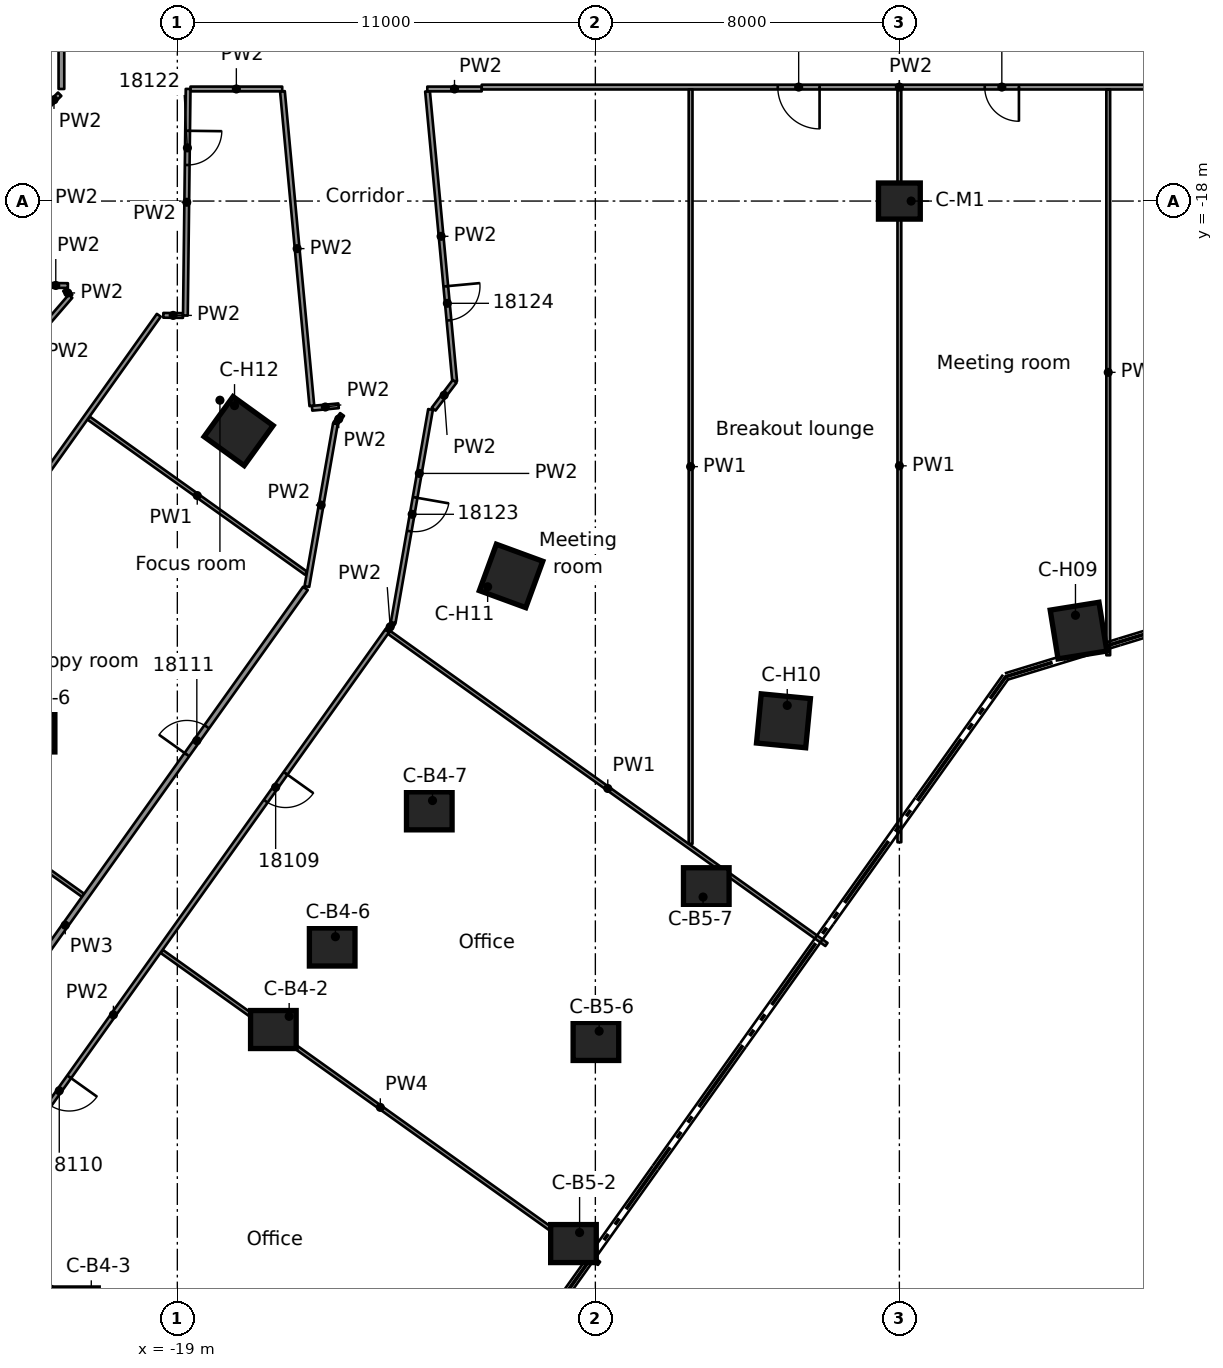
"""IFC4 building model, lengths in metres.
Left out: names, types, materials, properties, quantities, classifications, styles, units other than length and angle.
Written with IfcOpenShell. Run it as: python <this file> out.ifc"""

import sys

from ifc_helpers import new_model, si_unit, direction, frame, frame_2d, origin, origin_2d, place, context, subcontext, project, spatial, rectangle, extrude, element, fill, save


model = new_model("IFC4")
c1 = context("Model", 3, precision=1e-05, world=origin(), true_north=direction((0.0, 1.0)))
c2 = subcontext(c1, "Body", "Model", "MODEL_VIEW")
j1 = project(units=[si_unit("LENGTHUNIT", "METRE"), si_unit("PLANEANGLEUNIT", "RADIAN")], contexts=[c1])
p1 = place(None, origin())
s1 = spatial("IfcSite", under=j1, at=p1, CompositionType="ELEMENT")
p2 = place(p1, origin())
s2 = spatial("IfcBuilding", under=s1, at=p2, CompositionType="ELEMENT")
p3 = place(p2, frame((0.0, 0.0, 91.2)))
s3 = spatial("IfcBuildingStorey", under=s2, at=p3, CompositionType="ELEMENT", Elevation=91.2)
for number, where, z_axis, x_axis in (
    (1, (-22.822, -31.995, 0.0), (0.0, 0.0, 1.0), (1.0, 0.0, 0.0)),
    (2, (-16.473, -39.799, 0.0), (0.0, 0.0, 1.0), (1.0, 0.0, 0.0)),
    (3, (-21.68, -47.098, 0.0), (0.0, 0.0, 1.0), (1.0, 0.0, 0.0)),
    (4, (-14.925, -37.628, 0.0), (0.0, 0.0, 1.0), (1.0, 0.0, 0.0)),
    (5, (-12.37, -34.045, 0.0), (0.0, 0.0, 1.0), (1.0, 0.0, 0.0)),
    (6, (-8.576, -45.431, 0.0), (0.0, 0.0, 1.0), (1.0, 0.0, 0.0)),
    (7, (-7.985, -40.113, 0.0), (0.0, 0.0, 1.0), (1.0, 0.0, 0.0)),
    (8, (-5.081, -36.042, 0.0), (0.0, 0.0, 1.0), (1.0, 0.0, 0.0)),
):
    element("IfcColumn", number, at=place(p3, frame(where, z_axis=z_axis, x_axis=x_axis)), inside=s3, PredefinedType="COLUMN", context=c2, shape_type="SweptSolid", body=[
        extrude(rectangle(XDim=1.2, YDim=1.0, at=origin_2d()), origin(), (0.0, 0.0, 1.0), 3.5),
    ])
for number, where, z_axis, x_axis in (
    (9, (4.714, -29.302, 0.0), (0.0, 0.0, 1.0), (0.159, -0.987, 0.0)),
    (10, (-3.05, -31.676, 0.0), (0.0, 0.0, 1.0), (-0.096, -0.995, 0.0)),
    (11, (-10.218, -27.864, 0.0), (0.0, 0.0, 1.0), (-0.344, -0.939, 0.0)),
    (12, (-17.387, -24.053, 0.0), (0.0, 0.0, 1.0), (-0.586, -0.81, 0.0)),
):
    element("IfcColumn", number, at=place(p3, frame(where, z_axis=z_axis, x_axis=x_axis)), inside=s3, PredefinedType="COLUMN", context=c2, shape_type="SweptSolid", body=[
        extrude(rectangle(XDim=1.3, YDim=1.3, at=origin_2d()), origin(), (0.0, 0.0, 1.0), 3.5),
    ])
p4 = place(p3, frame((0.0, -18.0, 0.0), z_axis=(0.0, 0.0, 1.0), x_axis=(1.0, 0.0, 0.0)))
e13 = element("IfcColumn", 13, at=p4, inside=s3, PredefinedType="COLUMN", context=c2, shape_type="SweptSolid", body=[
    extrude(rectangle(XDim=1.1, YDim=0.95, at=origin_2d()), origin(), (0.0, 0.0, 1.0), 3.5),
])
p5 = place(p3, frame((-16.234, -15.113, 0.0), z_axis=(0.0, 0.0, 1.0), x_axis=(0.093098705764, -0.995656884165, 0.0)))
e14 = element("IfcWall", 14, at=p5, inside=s3, PredefinedType="PARTITIONING", context=c2, shape_type="SweptSolid", body=[
    extrude(rectangle(XDim=8.313, YDim=0.125, at=frame_2d((4.156, 0.0))), origin(), (0.0, 0.0, 1.0), 3.08),
])
p6 = place(p3, frame((-12.416, -15.113, 0.0), z_axis=(0.0, 0.0, 1.0), x_axis=(0.093186749475, -0.995648647728, 0.0)))
e15 = element("IfcWall", 15, at=p6, inside=s3, PredefinedType="PARTITIONING", context=c2, shape_type="SweptSolid", body=[
    extrude(rectangle(XDim=7.663, YDim=0.125, at=frame_2d((3.832, 0.0))), origin(), (0.0, 0.0, 1.0), 3.08),
])
p7 = place(p6, frame((5.152, 0.0, 0.0)))
e16 = element("IfcOpeningElement", 16, at=p7, cuts=e15, PredefinedType="OPENING", context=c2, shape_type="SweptSolid", body=[
    extrude(rectangle(XDim=0.9, YDim=2.1, at=frame_2d((0.45, 1.05))), frame((0.0, 0.073, 0.0), z_axis=(0.0, -1.0, 0.0), x_axis=(1.0, 0.0, 0.0)), (0.0, 0.0, 1.0), 0.145),
])
p8 = place(p3, frame((-21.955, -20.33, 0.0), z_axis=(0.0, 0.0, 1.0), x_axis=(0.635933908165, -0.771743522451, 0.0)))
e17 = element("IfcWall", 17, at=p8, inside=s3, PredefinedType="PARTITIONING", context=c2, shape_type="SweptSolid", body=[
    extrude(rectangle(XDim=0.227, YDim=0.125, at=frame_2d((0.113, 0.0))), origin(), (0.0, 0.0, 1.0), 3.08),
])
p9 = place(p3, frame((-24.581, -44.988, 0.0), z_axis=(0.0, 0.0, 1.0), x_axis=(0.814126528241, -0.580687520112, 0.0)))
e18 = element("IfcWall", 18, at=p9, inside=s3, PredefinedType="PARTITIONING", context=c2, shape_type="SweptSolid", body=[
    extrude(rectangle(XDim=14.137, YDim=0.1, at=frame_2d((7.068, 0.0))), origin(), (0.0, 0.0, 1.0), 3.08),
])
p10 = place(p3, frame((-27.317, -32.104, 0.0), z_axis=(0.0, 0.0, 1.0), x_axis=(0.814119765042, -0.580697002031, 0.0)))
e19 = element("IfcWall", 19, at=p10, inside=s3, PredefinedType="PARTITIONING", context=c2, shape_type="SweptSolid", body=[
    extrude(rectangle(XDim=7.171, YDim=0.1, at=frame_2d((3.585, 0.0))), origin(), (0.0, 0.0, 1.0), 3.08),
])
p11 = place(p3, frame((-19.413, -37.742, 0.0), z_axis=(0.0, 0.0, 1.0), x_axis=(0.81409387042, -0.580733303801, 0.0)))
e20 = element("IfcWall", 20, at=p11, inside=s3, PredefinedType="PARTITIONING", context=c2, shape_type="SweptSolid", body=[
    extrude(rectangle(XDim=14.137, YDim=0.1, at=frame_2d((7.069, 0.0))), origin(), (0.0, 0.0, 1.0), 2.445),
])
p12 = place(p3, frame((-21.337, -23.709, 0.0), z_axis=(0.0, 0.0, 1.0), x_axis=(0.814073636445, -0.580761667507, 0.0)))
e21 = element("IfcWall", 21, at=p12, inside=s3, PredefinedType="PARTITIONING", context=c2, shape_type="SweptSolid", body=[
    extrude(rectangle(XDim=7.029, YDim=0.1, at=frame_2d((3.514, 0.0))), origin(), (0.0, 0.0, 1.0), 3.08),
])
p13 = place(p3, frame((-13.427, -29.351, 0.0), z_axis=(0.0, 0.0, 1.0), x_axis=(0.814070572037, -0.580765962969, 0.0)))
e22 = element("IfcWall", 22, at=p13, inside=s3, PredefinedType="PARTITIONING", context=c2, shape_type="SweptSolid", body=[
    extrude(rectangle(XDim=14.136, YDim=0.1, at=frame_2d((7.068, 0.0))), origin(), (0.0, 0.0, 1.0), 3.08),
])
p14 = place(p3, frame((-19.368, -21.006, 0.0), z_axis=(0.0, 0.0, 1.0), x_axis=(0.999935744707, -0.011336068906, 0.0)))
e23 = element("IfcWall", 23, at=p14, inside=s3, PredefinedType="PARTITIONING", context=c2, shape_type="SweptSolid", body=[
    extrude(rectangle(XDim=0.517, YDim=0.125, at=frame_2d((0.258, 0.0))), origin(), (0.0, 0.0, 1.0), 3.08),
])
p15 = place(p3, frame((-22.517, -20.217, 0.0), z_axis=(0.0, 0.0, 1.0), x_axis=(0.99993827732, -0.011110425304, 0.0)))
e24 = element("IfcWall", 24, at=p15, inside=s3, PredefinedType="PARTITIONING", context=c2, shape_type="SweptSolid", body=[
    extrude(rectangle(XDim=0.637, YDim=0.125, at=frame_2d((0.319, 0.0))), origin(), (0.0, 0.0, 1.0), 3.08),
])
p16 = place(p3, frame((-18.654, -15.051, 0.0), z_axis=(0.0, 0.0, 1.0), x_axis=(1.0, 0.0, 0.0)))
e25 = element("IfcWall", 25, at=p16, inside=s3, PredefinedType="PARTITIONING", context=c2, shape_type="SweptSolid", body=[
    extrude(rectangle(XDim=2.414, YDim=0.125, at=frame_2d((1.207, 0.0))), origin(), (0.0, 0.0, 1.0), 3.08),
])
p17 = place(p3, frame((-12.422, -15.051, 0.0), z_axis=(0.0, 0.0, 1.0), x_axis=(1.0, 0.0, 0.0)))
e26 = element("IfcWall", 26, at=p17, inside=s3, PredefinedType="PARTITIONING", context=c2, shape_type="SweptSolid", body=[
    extrude(rectangle(XDim=1.431, YDim=0.125, at=frame_2d((0.716, 0.0))), origin(), (0.0, 0.0, 1.0), 3.08),
])
p18 = place(p3, frame((10.99, -15.001, 0.0), z_axis=(0.0, 0.0, 1.0), x_axis=(-1.0, 0.0, 0.0)))
e27 = element("IfcWall", 27, at=p18, inside=s3, PredefinedType="PARTITIONING", context=c2, shape_type="SweptSolid", body=[
    extrude(rectangle(XDim=21.98, YDim=0.125, at=frame_2d((10.99, 0.0))), origin(), (0.0, 0.0, 1.0), 3.08),
])
p19 = place(p18, frame((13.09, 0.0, 0.0)))
e28 = element("IfcOpeningElement", 28, at=p19, cuts=e27, PredefinedType="OPENING", context=c2, shape_type="SweptSolid", body=[
    extrude(rectangle(XDim=1.1, YDim=2.1, at=frame_2d((0.55, 1.05))), frame((0.0, 0.073, 0.0), z_axis=(0.0, -1.0, 0.0), x_axis=(1.0, 0.0, 0.0)), (0.0, 0.0, 1.0), 0.145),
])
p20 = place(p18, frame((7.844, 0.0, 0.0)))
e29 = element("IfcOpeningElement", 29, at=p20, cuts=e27, PredefinedType="OPENING", context=c2, shape_type="SweptSolid", body=[
    extrude(rectangle(XDim=0.9, YDim=2.1, at=frame_2d((0.45, 1.05))), frame((0.0, 0.073, 0.0), z_axis=(0.0, -1.0, 0.0), x_axis=(1.0, 0.0, 0.0)), (0.0, 0.0, 1.0), 0.145),
])
p21 = place(p18, frame((1.85, 0.0, 0.0)))
e30 = element("IfcOpeningElement", 30, at=p21, cuts=e27, PredefinedType="OPENING", context=c2, shape_type="SweptSolid", body=[
    extrude(rectangle(XDim=1.8, YDim=2.1, at=frame_2d((0.9, 1.05))), frame((0.0, 0.073, 0.0), z_axis=(0.0, -1.0, 0.0), x_axis=(1.0, 0.0, 0.0)), (0.0, 0.0, 1.0), 0.145),
])
p22 = place(p3, frame((-12.256, -23.476, 0.0), z_axis=(0.0, 0.0, 1.0), x_axis=(0.603013454961, 0.797731015528, 0.0)))
e31 = element("IfcWall", 31, at=p22, inside=s3, PredefinedType="PARTITIONING", context=c2, shape_type="SweptSolid", body=[
    extrude(rectangle(XDim=0.919, YDim=0.125, at=frame_2d((0.459, 0.0))), origin(), (0.0, 0.0, 1.0), 3.08),
])
p23 = place(p3, frame((-15.454, -23.452, 0.0), z_axis=(0.0, 0.0, 1.0), x_axis=(0.995687741578, 0.09276810482, 0.0)))
e32 = element("IfcWall", 32, at=p23, inside=s3, PredefinedType="PARTITIONING", context=c2, shape_type="SweptSolid", body=[
    extrude(rectangle(XDim=0.7, YDim=0.125, at=frame_2d((0.35, 0.0))), origin(), (0.0, 0.0, 1.0), 3.08),
])
p24 = place(p3, frame((-21.811, -20.505, 0.0), z_axis=(0.0, 0.0, 1.0), x_axis=(-0.65355749983, -0.756876868728, 0.0)))
e33 = element("IfcWall", 33, at=p24, inside=s3, PredefinedType="PARTITIONING", context=c2, shape_type="SweptSolid", body=[
    extrude(rectangle(XDim=2.344, YDim=0.125, at=frame_2d((1.172, 0.0))), origin(), (0.0, 0.0, 1.0), 3.08),
])
p25 = place(p3, frame((-22.395, -15.484, 0.0), z_axis=(0.0, 0.0, 1.0), x_axis=(0.712030137996, 0.702148903428, 0.0)))
e34 = element("IfcWall", 34, at=p25, inside=s3, PredefinedType="PARTITIONING", context=c2, shape_type="SweptSolid", body=[
    extrude(rectangle(XDim=0.42, YDim=0.125, at=frame_2d((0.21, 0.0))), origin(), (0.0, 0.0, 1.0), 3.08),
])
p26 = place(p3, frame((-14.84, -23.857, 0.0), z_axis=(0.0, 0.0, 1.0), x_axis=(0.586176879317, 0.810183106559, 0.0)))
e35 = element("IfcWall", 35, at=p26, inside=s3, PredefinedType="PARTITIONING", context=c2, shape_type="SweptSolid", body=[
    extrude(rectangle(XDim=0.299, YDim=0.125, at=frame_2d((0.149, 0.0))), origin(), (0.0, 0.0, 1.0), 3.08),
])
p27 = place(p3, frame((-13.478, -29.315, 0.0), z_axis=(0.0, 0.0, 1.0), x_axis=(0.581578261401, 0.813490458374, 0.0)))
e36 = element("IfcWall", 36, at=p27, inside=s3, PredefinedType="PARTITIONING", context=c2, shape_type="SweptSolid", body=[
    extrude(rectangle(XDim=0.271, YDim=0.125, at=frame_2d((0.136, 0.0))), origin(), (0.0, 0.0, 1.0), 3.08),
])
p28 = place(p3, frame((-13.48, -29.312, 0.0), z_axis=(0.0, 0.0, 1.0), x_axis=(-0.580603145907, -0.814186702767, 0.0)))
e37 = element("IfcWall", 37, at=p28, inside=s3, PredefinedType="PARTITIONING", context=c2, shape_type="SweptSolid", body=[
    extrude(rectangle(XDim=24.809, YDim=0.125, at=frame_2d((12.404, 0.0))), origin(), (0.0, 0.0, 1.0), 3.08),
])
p29 = place(p28, frame((4.601, 0.0, 0.0)))
e38 = element("IfcOpeningElement", 38, at=p29, cuts=e37, PredefinedType="OPENING", context=c2, shape_type="SweptSolid", body=[
    extrude(rectangle(XDim=0.9, YDim=2.1, at=frame_2d((0.45, 1.05))), frame((0.0, 0.073, 0.0), z_axis=(0.0, -1.0, 0.0), x_axis=(1.0, 0.0, 0.0)), (0.0, 0.0, 1.0), 0.145),
])
p30 = place(p28, frame((14.408, 0.0, 0.0)))
e39 = element("IfcOpeningElement", 39, at=p30, cuts=e37, PredefinedType="OPENING", context=c2, shape_type="SweptSolid", body=[
    extrude(rectangle(XDim=0.9, YDim=2.1, at=frame_2d((0.45, 1.05))), frame((0.0, 0.073, 0.0), z_axis=(0.0, -1.0, 0.0), x_axis=(1.0, 0.0, 0.0)), (0.0, 0.0, 1.0), 0.145),
])
p31 = place(p28, frame((20.309, 0.0, 0.0)))
e40 = element("IfcOpeningElement", 40, at=p31, cuts=e37, PredefinedType="OPENING", context=c2, shape_type="SweptSolid", body=[
    extrude(rectangle(XDim=0.9, YDim=2.1, at=frame_2d((0.45, 1.05))), frame((0.0, 0.073, 0.0), z_axis=(0.0, -1.0, 0.0), x_axis=(1.0, 0.0, 0.0)), (0.0, 0.0, 1.0), 0.145),
])
p32 = place(p3, frame((-28.27, -45.918, 0.0), z_axis=(0.0, 0.0, 1.0), x_axis=(0.580618548841, 0.81417571859, 0.0)))
e41 = element("IfcWall", 41, at=p32, inside=s3, PredefinedType="PARTITIONING", context=c2, shape_type="SweptSolid", body=[
    extrude(rectangle(XDim=21.772, YDim=0.15, at=frame_2d((10.886, 0.0))), origin(), (0.0, 0.0, 1.0), 3.08),
])
p33 = place(p32, frame((16.399, 0.0, 0.0)))
e42 = element("IfcOpeningElement", 42, at=p33, cuts=e41, PredefinedType="OPENING", context=c2, shape_type="SweptSolid", body=[
    extrude(rectangle(XDim=0.9, YDim=2.1, at=frame_2d((0.45, 1.05))), frame((0.0, 0.085, 0.0), z_axis=(0.0, -1.0, 0.0), x_axis=(1.0, 0.0, 0.0)), (0.0, 0.0, 1.0), 0.17),
])
p34 = place(p32, frame((6.999, 0.0, 0.0)))
e43 = element("IfcOpeningElement", 43, at=p34, cuts=e41, PredefinedType="OPENING", context=c2, shape_type="SweptSolid", body=[
    extrude(rectangle(XDim=0.9, YDim=2.1, at=frame_2d((0.45, 1.05))), frame((0.0, 0.085, 0.0), z_axis=(0.0, -1.0, 0.0), x_axis=(1.0, 0.0, 0.0)), (0.0, 0.0, 1.0), 0.17),
])
p35 = place(p3, frame((-32.532, -39.317, 0.0), z_axis=(0.0, 0.0, 1.0), x_axis=(0.58017556932, 0.814491441799, 0.0)))
e44 = element("IfcWall", 44, at=p35, inside=s3, PredefinedType="PARTITIONING", context=c2, shape_type="SweptSolid", body=[
    extrude(rectangle(XDim=22.483, YDim=0.125, at=frame_2d((11.241, 0.0))), origin(), (0.0, 0.0, 1.0), 3.08),
])
p36 = place(p3, frame((-12.337, -23.484, 0.0), z_axis=(0.0, 0.0, 1.0), x_axis=(-0.172645513087, -0.984984023632, 0.0)))
e45 = element("IfcWall", 45, at=p36, inside=s3, PredefinedType="PARTITIONING", context=c2, shape_type="SweptSolid", body=[
    extrude(rectangle(XDim=5.695, YDim=0.125, at=frame_2d((2.847, 0.0))), origin(), (0.0, 0.0, 1.0), 3.08),
])
p37 = place(p36, frame((2.35, 0.0, 0.0)))
e46 = element("IfcOpeningElement", 46, at=p37, cuts=e45, PredefinedType="OPENING", context=c2, shape_type="SweptSolid", body=[
    extrude(rectangle(XDim=0.9, YDim=2.1, at=frame_2d((0.45, 1.05))), frame((0.0, 0.073, 0.0), z_axis=(0.0, -1.0, 0.0), x_axis=(1.0, 0.0, 0.0)), (0.0, 0.0, 1.0), 0.145),
])
p38 = place(p3, frame((-14.84, -23.857, 0.0), z_axis=(0.0, 0.0, 1.0), x_axis=(-0.172581751395, -0.984995197494, 0.0)))
e47 = element("IfcWall", 47, at=p38, inside=s3, PredefinedType="PARTITIONING", context=c2, shape_type="SweptSolid", body=[
    extrude(rectangle(XDim=4.351, YDim=0.125, at=frame_2d((2.176, 0.0))), origin(), (0.0, 0.0, 1.0), 3.08),
])
p39 = place(p3, frame((-18.716, -15.05, 0.0), z_axis=(0.0, 0.0, 1.0), x_axis=(-0.012077402732, -0.999927065512, 0.0)))
e48 = element("IfcWall", 48, at=p39, inside=s3, PredefinedType="PARTITIONING", context=c2, shape_type="SweptSolid", body=[
    extrude(rectangle(XDim=5.963, YDim=0.125, at=frame_2d((2.982, 0.0))), origin(), (0.0, 0.0, 1.0), 3.08),
])
p40 = place(p39, frame((1.101, 0.0, 0.0)))
e49 = element("IfcOpeningElement", 49, at=p40, cuts=e48, PredefinedType="OPENING", context=c2, shape_type="SweptSolid", body=[
    extrude(rectangle(XDim=0.9, YDim=2.1, at=frame_2d((0.45, 1.05))), frame((0.0, 0.073, 0.0), z_axis=(0.0, -1.0, 0.0), x_axis=(1.0, 0.0, 0.0)), (0.0, 0.0, 1.0), 0.145),
])
p41 = place(p3, frame((5.496, -29.951, 0.0), z_axis=(0.0, 0.0, 1.0), x_axis=(0.0, 1.0, 0.0)))
e50 = element("IfcWall", 50, at=p41, inside=s3, PredefinedType="PARTITIONING", context=c2, shape_type="SweptSolid", body=[
    extrude(rectangle(XDim=14.888, YDim=0.1, at=frame_2d((7.444, 0.0))), origin(), (0.0, 0.0, 1.0), 3.08),
])
p42 = place(p3, frame((0.0, -34.871, 0.0), z_axis=(0.0, 0.0, 1.0), x_axis=(0.0, 1.0, 0.0)))
e51 = element("IfcWall", 51, at=p42, inside=s3, PredefinedType="PARTITIONING", context=c2, shape_type="SweptSolid", body=[
    extrude(rectangle(XDim=19.808, YDim=0.1, at=frame_2d((9.904, 0.0))), origin(), (0.0, 0.0, 1.0), 3.08),
])
p43 = place(p3, frame((-5.494, -34.913, 0.0), z_axis=(0.0, 0.0, 1.0), x_axis=(0.0, 1.0, 0.0)))
e52 = element("IfcWall", 52, at=p43, inside=s3, PredefinedType="PARTITIONING", context=c2, shape_type="SweptSolid", body=[
    extrude(rectangle(XDim=19.85, YDim=0.1, at=frame_2d((9.925, 0.0))), origin(), (0.0, 0.0, 1.0), 3.08),
])
p44 = place(p3, frame((-22.05, -15.051, 0.0), z_axis=(0.0, 0.0, 1.0), x_axis=(0.0, 1.0, 0.0)))
e53 = element("IfcWall", 53, at=p44, inside=s3, PredefinedType="PARTITIONING", context=c2, shape_type="SweptSolid", body=[
    extrude(rectangle(XDim=30.102, YDim=0.15, at=frame_2d((15.051, 0.0))), origin(), (0.0, 0.0, 1.0), 3.08),
])
p45 = place(p44, frame((11.651, 0.0, 0.0)))
e54 = element("IfcOpeningElement", 54, at=p45, cuts=e53, PredefinedType="OPENING", context=c2, shape_type="SweptSolid", body=[
    extrude(rectangle(XDim=0.9, YDim=2.1, at=frame_2d((0.45, 1.05))), frame((0.0, 0.085, 0.0), z_axis=(0.0, -1.0, 0.0), x_axis=(1.0, 0.0, 0.0)), (0.0, 0.0, 1.0), 0.17),
])
p46 = place(p44, frame((1.1, 0.0, 0.0)))
e55 = element("IfcOpeningElement", 55, at=p46, cuts=e53, PredefinedType="OPENING", context=c2, shape_type="SweptSolid", body=[
    extrude(rectangle(XDim=0.9, YDim=2.1, at=frame_2d((0.45, 1.05))), frame((0.0, 0.085, 0.0), z_axis=(0.0, -1.0, 0.0), x_axis=(1.0, 0.0, 0.0)), (0.0, 0.0, 1.0), 0.17),
])
p47 = place(p44, frame((23.402, 0.0, 0.0)))
e56 = element("IfcOpeningElement", 56, at=p47, cuts=e53, PredefinedType="OPENING", context=c2, shape_type="SweptSolid", body=[
    extrude(rectangle(XDim=1.1, YDim=2.1, at=frame_2d((0.55, 1.05))), frame((0.0, 0.085, 0.0), z_axis=(0.0, -1.0, 0.0), x_axis=(1.0, 0.0, 0.0)), (0.0, 0.0, 1.0), 0.17),
])
p48 = place(p29, origin())
e57 = element("IfcDoor", 57, at=p48, inside=s3, OperationType="SINGLE_SWING_LEFT", PredefinedType="DOOR", context=c2, shape_type="SweptSolid", body=[
    extrude(rectangle(XDim=0.9, YDim=2.1, at=frame_2d((0.45, 1.05))), frame((0.0, 0.025, 0.0), z_axis=(0.0, -1.0, 0.0), x_axis=(1.0, 0.0, 0.0)), (0.0, 0.0, 1.0), 0.05),
])
fill(e38, e57)
p49 = place(p30, origin())
e58 = element("IfcDoor", 58, at=p49, inside=s3, OperationType="SINGLE_SWING_RIGHT", PredefinedType="DOOR", context=c2, shape_type="SweptSolid", body=[
    extrude(rectangle(XDim=0.9, YDim=2.1, at=frame_2d((0.45, 1.05))), frame((0.0, 0.025, 0.0), z_axis=(0.0, -1.0, 0.0), x_axis=(1.0, 0.0, 0.0)), (0.0, 0.0, 1.0), 0.05),
])
fill(e39, e58)
p50 = place(p33, origin())
e59 = element("IfcDoor", 59, at=p50, inside=s3, OperationType="SINGLE_SWING_RIGHT", PredefinedType="DOOR", context=c2, shape_type="SweptSolid", body=[
    extrude(rectangle(XDim=0.9, YDim=2.1, at=frame_2d((0.45, 1.05))), frame((0.0, 0.025, 0.0), z_axis=(0.0, -1.0, 0.0), x_axis=(1.0, 0.0, 0.0)), (0.0, 0.0, 1.0), 0.05),
])
fill(e42, e59)
p51 = place(p40, origin())
e60 = element("IfcDoor", 60, at=p51, inside=s3, OperationType="SINGLE_SWING_LEFT", PredefinedType="DOOR", context=c2, shape_type="SweptSolid", body=[
    extrude(rectangle(XDim=0.9, YDim=2.1, at=frame_2d((0.45, 1.05))), frame((0.0, 0.025, 0.0), z_axis=(0.0, -1.0, 0.0), x_axis=(1.0, 0.0, 0.0)), (0.0, 0.0, 1.0), 0.05),
])
fill(e49, e60)
p52 = place(p37, origin())
e61 = element("IfcDoor", 61, at=p52, inside=s3, OperationType="SINGLE_SWING_LEFT", PredefinedType="DOOR", context=c2, shape_type="SweptSolid", body=[
    extrude(rectangle(XDim=0.9, YDim=2.1, at=frame_2d((0.45, 1.05))), frame((0.0, 0.025, 0.0), z_axis=(0.0, -1.0, 0.0), x_axis=(1.0, 0.0, 0.0)), (0.0, 0.0, 1.0), 0.05),
])
fill(e46, e61)
p53 = place(p7, origin())
e62 = element("IfcDoor", 62, at=p53, inside=s3, OperationType="SINGLE_SWING_RIGHT", PredefinedType="DOOR", context=c2, shape_type="SweptSolid", body=[
    extrude(rectangle(XDim=0.9, YDim=2.1, at=frame_2d((0.45, 1.05))), frame((0.0, 0.025, 0.0), z_axis=(0.0, -1.0, 0.0), x_axis=(1.0, 0.0, 0.0)), (0.0, 0.0, 1.0), 0.05),
])
fill(e16, e62)
p54 = place(p19, origin())
e63 = element("IfcDoor", 63, at=p54, inside=s3, OperationType="SINGLE_SWING_RIGHT", PredefinedType="DOOR", context=c2, shape_type="SweptSolid", body=[
    extrude(rectangle(XDim=1.1, YDim=2.1, at=frame_2d((0.55, 1.05))), frame((0.0, 0.025, 0.0), z_axis=(0.0, -1.0, 0.0), x_axis=(1.0, 0.0, 0.0)), (0.0, 0.0, 1.0), 0.05),
])
fill(e28, e63)
p55 = place(p20, origin())
e64 = element("IfcDoor", 64, at=p55, inside=s3, OperationType="SINGLE_SWING_LEFT", PredefinedType="DOOR", context=c2, shape_type="SweptSolid", body=[
    extrude(rectangle(XDim=0.9, YDim=2.1, at=frame_2d((0.45, 1.05))), frame((0.0, 0.025, 0.0), z_axis=(0.0, -1.0, 0.0), x_axis=(1.0, 0.0, 0.0)), (0.0, 0.0, 1.0), 0.05),
])
fill(e29, e64)
save(model, sys.argv[1])
